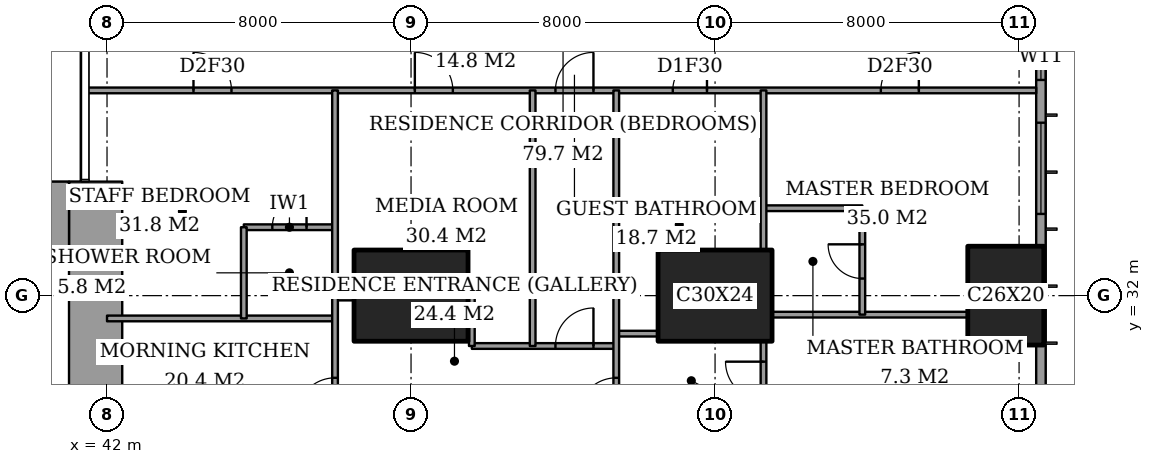
"""IFC4 building model, lengths in metres.
Left out: names, types, materials, properties, quantities, classifications, styles, units other than length and angle.
Written with IfcOpenShell. Run it as: python <this file> out.ifc"""

import sys

from ifc_helpers import new_model, si_unit, direction, frame, frame_2d, origin, origin_2d, place, context, subcontext, project, spatial, rectangle, extrude, element, fill, save


model = new_model("IFC4")
c1 = context("Model", 3, precision=1e-05, world=origin(), true_north=direction((0.0, 1.0)))
c2 = subcontext(c1, "Body", "Model", "MODEL_VIEW")
j1 = project(units=[si_unit("LENGTHUNIT", "METRE"), si_unit("PLANEANGLEUNIT", "RADIAN")], contexts=[c1])
p1 = place(None, origin())
s1 = spatial("IfcSite", under=j1, at=p1, CompositionType="ELEMENT")
p2 = place(p1, origin())
s2 = spatial("IfcBuilding", under=s1, at=p2, CompositionType="ELEMENT")
p3 = place(p2, frame((0.0, 0.0, 164.6)))
s3 = spatial("IfcBuildingStorey", under=s2, at=p3, CompositionType="ELEMENT", Elevation=164.6)
for number, where, z_axis, x_axis in (
    (1, (50.0, 32.0, 0.0), (0.0, 0.0, 1.0), (1.0, 0.0, 0.0)),
    (2, (58.0, 32.0, 0.0), (0.0, 0.0, 1.0), (1.0, 0.0, 0.0)),
):
    element("IfcColumn", number, at=place(p3, frame(where, z_axis=z_axis, x_axis=x_axis)), inside=s3, PredefinedType="COLUMN", context=c2, shape_type="SweptSolid", body=[
        extrude(rectangle(XDim=3.0, YDim=2.4, at=origin_2d()), origin(), (0.0, 0.0, 1.0), 3.6),
    ])
p4 = place(p3, frame((65.65, 32.0, 0.0), z_axis=(0.0, 0.0, 1.0), x_axis=(0.0, 1.0, 0.0)))
e3 = element("IfcColumn", 3, at=p4, inside=s3, PredefinedType="COLUMN", context=c2, shape_type="SweptSolid", body=[
    extrude(rectangle(XDim=2.6, YDim=2.0, at=origin_2d()), origin(), (0.0, 0.0, 1.0), 3.6),
])
p5 = place(p3, frame((37.85, 34.0, 0.0), z_axis=(0.0, 0.0, 1.0), x_axis=(1.0, 0.0, 0.0)))
e4 = element("IfcWall", 4, at=p5, inside=s3, PredefinedType="SHEAR", context=c2, shape_type="SweptSolid", body=[
    extrude(rectangle(XDim=3.15, YDim=2.0, at=frame_2d((1.575, 0.0))), origin(), (0.0, 0.0, 1.0), 3.6),
])
p6 = place(p3, frame((41.7, 24.85, 0.0), z_axis=(0.0, 0.0, 1.0), x_axis=(0.0, 1.0, 0.0)))
e5 = element("IfcWall", 5, at=p6, inside=s3, PredefinedType="SHEAR", context=c2, shape_type="SweptSolid", body=[
    extrude(rectangle(XDim=10.15, YDim=1.4, at=frame_2d((5.075, 0.0))), origin(), (0.0, 0.0, 1.0), 3.6),
])
p7 = place(p3, frame((66.575, 3.175, 0.0), z_axis=(0.0, 0.0, 1.0), x_axis=(0.0, 1.0, 0.0)))
e6 = element("IfcWall", 6, at=p7, inside=s3, PredefinedType="SOLIDWALL", context=c2, shape_type="SweptSolid", body=[
    extrude(rectangle(XDim=41.65, YDim=0.25, at=frame_2d((20.825, 0.0))), origin(), (0.0, 0.0, 1.0), 3.6),
])
p8 = place(p7, frame((0.775, 0.0, 0.4)))
e7 = element("IfcOpeningElement", 7, at=p8, cuts=e6, PredefinedType="OPENING", context=c2, shape_type="SweptSolid", body=[
    extrude(rectangle(XDim=2.4, YDim=2.2, at=frame_2d((1.2, 1.1))), frame((0.0, 0.135, 0.0), z_axis=(0.0, -1.0, 0.0), x_axis=(1.0, 0.0, 0.0)), (0.0, 0.0, 1.0), 0.27),
])
p9 = place(p7, frame((6.225, 0.0, 0.4)))
e8 = element("IfcOpeningElement", 8, at=p9, cuts=e6, PredefinedType="OPENING", context=c2, shape_type="SweptSolid", body=[
    extrude(rectangle(XDim=1.2, YDim=2.2, at=frame_2d((0.6, 1.1))), frame((0.0, 0.135, 0.0), z_axis=(0.0, -1.0, 0.0), x_axis=(1.0, 0.0, 0.0)), (0.0, 0.0, 1.0), 0.27),
])
p10 = place(p7, frame((8.475, 0.0, 0.4)))
e9 = element("IfcOpeningElement", 9, at=p10, cuts=e6, PredefinedType="OPENING", context=c2, shape_type="SweptSolid", body=[
    extrude(rectangle(XDim=2.4, YDim=2.2, at=frame_2d((1.2, 1.1))), frame((0.0, 0.135, 0.0), z_axis=(0.0, -1.0, 0.0), x_axis=(1.0, 0.0, 0.0)), (0.0, 0.0, 1.0), 0.27),
])
p11 = place(p7, frame((15.775, 0.0, 0.4)))
e10 = element("IfcOpeningElement", 10, at=p11, cuts=e6, PredefinedType="OPENING", context=c2, shape_type="SweptSolid", body=[
    extrude(rectangle(XDim=2.4, YDim=2.2, at=frame_2d((1.2, 1.1))), frame((0.0, 0.135, 0.0), z_axis=(0.0, -1.0, 0.0), x_axis=(1.0, 0.0, 0.0)), (0.0, 0.0, 1.0), 0.27),
])
p12 = place(p7, frame((23.475, 0.0, 0.4)))
e11 = element("IfcOpeningElement", 11, at=p12, cuts=e6, PredefinedType="OPENING", context=c2, shape_type="SweptSolid", body=[
    extrude(rectangle(XDim=2.4, YDim=2.2, at=frame_2d((1.2, 1.1))), frame((0.0, 0.135, 0.0), z_axis=(0.0, -1.0, 0.0), x_axis=(1.0, 0.0, 0.0)), (0.0, 0.0, 1.0), 0.27),
])
p13 = place(p7, frame((30.975, 0.0, 0.4)))
e12 = element("IfcOpeningElement", 12, at=p13, cuts=e6, PredefinedType="OPENING", context=c2, shape_type="SweptSolid", body=[
    extrude(rectangle(XDim=2.4, YDim=2.2, at=frame_2d((1.2, 1.1))), frame((0.0, 0.135, 0.0), z_axis=(0.0, -1.0, 0.0), x_axis=(1.0, 0.0, 0.0)), (0.0, 0.0, 1.0), 0.27),
])
p14 = place(p7, frame((34.5, 0.0, 0.4)))
e13 = element("IfcOpeningElement", 13, at=p14, cuts=e6, PredefinedType="OPENING", context=c2, shape_type="SweptSolid", body=[
    extrude(rectangle(XDim=1.2, YDim=2.2, at=frame_2d((0.6, 1.1))), frame((0.0, 0.135, 0.0), z_axis=(0.0, -1.0, 0.0), x_axis=(1.0, 0.0, 0.0)), (0.0, 0.0, 1.0), 0.27),
])
p15 = place(p7, frame((38.475, 0.0, 0.4)))
e14 = element("IfcOpeningElement", 14, at=p15, cuts=e6, PredefinedType="OPENING", context=c2, shape_type="SweptSolid", body=[
    extrude(rectangle(XDim=2.4, YDim=2.2, at=frame_2d((1.2, 1.1))), frame((0.0, 0.135, 0.0), z_axis=(0.0, -1.0, 0.0), x_axis=(1.0, 0.0, 0.0)), (0.0, 0.0, 1.0), 0.27),
])
p16 = place(p3, frame((51.6, 30.675, 0.0), z_axis=(0.0, 0.0, 1.0), x_axis=(1.0, 0.0, 0.0)))
e15 = element("IfcWall", 15, at=p16, inside=s3, PredefinedType="PARTITIONING", context=c2, shape_type="SweptSolid", body=[
    extrude(rectangle(XDim=3.8, YDim=0.15, at=frame_2d((1.9, 0.0))), origin(), (0.0, 0.0, 1.0), 3.35),
])
p17 = place(p16, frame((2.2, 0.0, 0.0)))
e16 = element("IfcOpeningElement", 16, at=p17, cuts=e15, PredefinedType="OPENING", context=c2, shape_type="SweptSolid", body=[
    extrude(rectangle(XDim=1.0, YDim=2.1, at=frame_2d((0.5, 1.05))), frame((0.0, 0.085, 0.0), z_axis=(0.0, -1.0, 0.0), x_axis=(1.0, 0.0, 0.0)), (0.0, 0.0, 1.0), 0.17),
])
p18 = place(p3, frame((55.4, 31.0, 0.0), z_axis=(0.0, 0.0, 1.0), x_axis=(1.0, 0.0, 0.0)))
e17 = element("IfcWall", 17, at=p18, inside=s3, PredefinedType="PARTITIONING", context=c2, shape_type="SweptSolid", body=[
    extrude(rectangle(XDim=1.1, YDim=0.15, at=frame_2d((0.55, 0.0))), origin(), (0.0, 0.0, 1.0), 3.35),
])
p19 = place(p3, frame((42.0, 31.4, 0.0), z_axis=(0.0, 0.0, 1.0), x_axis=(1.0, 0.0, 0.0)))
e18 = element("IfcWall", 18, at=p19, inside=s3, PredefinedType="PARTITIONING", context=c2, shape_type="SweptSolid", body=[
    extrude(rectangle(XDim=6.0, YDim=0.15, at=frame_2d((3.0, 0.0))), origin(), (0.0, 0.0, 1.0), 3.35),
])
p20 = place(p3, frame((59.5, 31.5, 0.0), z_axis=(0.0, 0.0, 1.0), x_axis=(1.0, 0.0, 0.0)))
e19 = element("IfcWall", 19, at=p20, inside=s3, PredefinedType="PARTITIONING", context=c2, shape_type="SweptSolid", body=[
    extrude(rectangle(XDim=5.15, YDim=0.15, at=frame_2d((2.575, 0.0))), origin(), (0.0, 0.0, 1.0), 3.35),
])
p21 = place(p3, frame((48.0, 31.95, 0.0), z_axis=(0.0, 0.0, 1.0), x_axis=(1.0, 0.0, 0.0)))
e20 = element("IfcWall", 20, at=p21, inside=s3, PredefinedType="PARTITIONING", context=c2, shape_type="SweptSolid", body=[
    extrude(rectangle(XDim=0.5, YDim=0.15, at=frame_2d((0.25, 0.0))), origin(), (0.0, 0.0, 1.0), 2.634),
])
p22 = place(p3, frame((45.6, 33.8, 0.0), z_axis=(0.0, 0.0, 1.0), x_axis=(1.0, 0.0, 0.0)))
e21 = element("IfcWall", 21, at=p22, inside=s3, PredefinedType="PARTITIONING", context=c2, shape_type="SweptSolid", body=[
    extrude(rectangle(XDim=2.4, YDim=0.15, at=frame_2d((1.2, 0.0))), origin(), (0.0, 0.0, 1.0), 3.35),
])
p23 = place(p22, frame((0.75, 0.0, 0.0)))
e22 = element("IfcOpeningElement", 22, at=p23, cuts=e21, PredefinedType="OPENING", context=c2, shape_type="SweptSolid", body=[
    extrude(rectangle(XDim=0.9, YDim=2.1, at=frame_2d((0.45, 1.05))), frame((0.0, 0.085, 0.0), z_axis=(0.0, -1.0, 0.0), x_axis=(1.0, 0.0, 0.0)), (0.0, 0.0, 1.0), 0.17),
])
p24 = place(p3, frame((59.275, 34.3, 0.0), z_axis=(0.0, 0.0, 1.0), x_axis=(1.0, 0.0, 0.0)))
e23 = element("IfcWall", 23, at=p24, inside=s3, PredefinedType="PARTITIONING", context=c2, shape_type="SweptSolid", body=[
    extrude(rectangle(XDim=2.6, YDim=0.15, at=frame_2d((1.3, 0.0))), origin(), (0.0, 0.0, 1.0), 3.35),
])
p25 = place(p3, frame((41.439, 37.4, 0.0), z_axis=(0.0, 0.0, 1.0), x_axis=(1.0, 0.0, 0.0)))
e24 = element("IfcWall", 24, at=p25, inside=s3, PredefinedType="PARTITIONING", context=c2, shape_type="SweptSolid", body=[
    extrude(rectangle(XDim=25.011, YDim=0.15, at=frame_2d((12.505, 0.0))), origin(), (0.0, 0.0, 1.0), 3.35),
])
p26 = place(p25, frame((12.361, 0.0, 0.0)))
e25 = element("IfcOpeningElement", 25, at=p26, cuts=e24, PredefinedType="OPENING", context=c2, shape_type="SweptSolid", body=[
    extrude(rectangle(XDim=1.0, YDim=2.1, at=frame_2d((0.5, 1.05))), frame((0.0, 0.085, 0.0), z_axis=(0.0, -1.0, 0.0), x_axis=(1.0, 0.0, 0.0)), (0.0, 0.0, 1.0), 0.17),
])
p27 = place(p25, frame((20.924, 0.0, 0.0)))
e26 = element("IfcOpeningElement", 26, at=p27, cuts=e24, PredefinedType="OPENING", context=c2, shape_type="SweptSolid", body=[
    extrude(rectangle(XDim=1.0, YDim=2.1, at=frame_2d((0.5, 1.05))), frame((0.0, 0.085, 0.0), z_axis=(0.0, -1.0, 0.0), x_axis=(1.0, 0.0, 0.0)), (0.0, 0.0, 1.0), 0.17),
])
p28 = place(p25, frame((15.448, 0.0, 0.0)))
e27 = element("IfcOpeningElement", 27, at=p28, cuts=e24, PredefinedType="OPENING", context=c2, shape_type="SweptSolid", body=[
    extrude(rectangle(XDim=0.9, YDim=2.1, at=frame_2d((0.45, 1.05))), frame((0.0, 0.085, 0.0), z_axis=(0.0, -1.0, 0.0), x_axis=(1.0, 0.0, 0.0)), (0.0, 0.0, 1.0), 0.17),
])
p29 = place(p25, frame((8.661, 0.0, 0.0)))
e28 = element("IfcOpeningElement", 28, at=p29, cuts=e24, PredefinedType="OPENING", context=c2, shape_type="SweptSolid", body=[
    extrude(rectangle(XDim=1.0, YDim=2.1, at=frame_2d((0.5, 1.05))), frame((0.0, 0.085, 0.0), z_axis=(0.0, -1.0, 0.0), x_axis=(1.0, 0.0, 0.0)), (0.0, 0.0, 1.0), 0.17),
])
p30 = place(p25, frame((2.836, 0.0, 0.0)))
e29 = element("IfcOpeningElement", 29, at=p30, cuts=e24, PredefinedType="OPENING", context=c2, shape_type="SweptSolid", body=[
    extrude(rectangle(XDim=1.0, YDim=2.1, at=frame_2d((0.5, 1.05))), frame((0.0, 0.085, 0.0), z_axis=(0.0, -1.0, 0.0), x_axis=(1.0, 0.0, 0.0)), (0.0, 0.0, 1.0), 0.17),
])
p31 = place(p3, frame((45.6, 31.4, 0.0), z_axis=(0.0, 0.0, 1.0), x_axis=(0.0, 1.0, 0.0)))
e30 = element("IfcWall", 30, at=p31, inside=s3, PredefinedType="PARTITIONING", context=c2, shape_type="SweptSolid", body=[
    extrude(rectangle(XDim=2.4, YDim=0.15, at=frame_2d((1.2, 0.0))), origin(), (0.0, 0.0, 1.0), 3.35),
])
p32 = place(p3, frame((48.0, 28.0, 0.0), z_axis=(0.0, 0.0, 1.0), x_axis=(0.0, 1.0, 0.0)))
e31 = element("IfcWall", 31, at=p32, inside=s3, PredefinedType="PARTITIONING", context=c2, shape_type="SweptSolid", body=[
    extrude(rectangle(XDim=9.4, YDim=0.15, at=frame_2d((4.7, 0.0))), origin(), (0.0, 0.0, 1.0), 3.35),
])
p33 = place(p32, frame((0.837, 0.0, 0.0)))
e32 = element("IfcOpeningElement", 32, at=p33, cuts=e31, PredefinedType="OPENING", context=c2, shape_type="SweptSolid", body=[
    extrude(rectangle(XDim=1.0, YDim=2.1, at=frame_2d((0.5, 1.05))), frame((0.0, 0.085, 0.0), z_axis=(0.0, -1.0, 0.0), x_axis=(1.0, 0.0, 0.0)), (0.0, 0.0, 1.0), 0.17),
])
p34 = place(p3, frame((51.6, 30.675, 0.0), z_axis=(0.0, 0.0, 1.0), x_axis=(0.0, 1.0, 0.0)))
e33 = element("IfcWall", 33, at=p34, inside=s3, PredefinedType="PARTITIONING", context=c2, shape_type="SweptSolid", body=[
    extrude(rectangle(XDim=1.275, YDim=0.15, at=frame_2d((0.637, 0.0))), origin(), (0.0, 0.0, 1.0), 3.35),
])
p35 = place(p3, frame((53.2, 30.675, 0.0), z_axis=(0.0, 0.0, 1.0), x_axis=(0.0, 1.0, 0.0)))
e34 = element("IfcWall", 34, at=p35, inside=s3, PredefinedType="PARTITIONING", context=c2, shape_type="SweptSolid", body=[
    extrude(rectangle(XDim=6.725, YDim=0.15, at=frame_2d((3.362, 0.0))), origin(), (0.0, 0.0, 1.0), 3.35),
])
p36 = place(p3, frame((55.4, 28.0, 0.0), z_axis=(0.0, 0.0, 1.0), x_axis=(0.0, 1.0, 0.0)))
e35 = element("IfcWall", 35, at=p36, inside=s3, PredefinedType="PARTITIONING", context=c2, shape_type="SweptSolid", body=[
    extrude(rectangle(XDim=9.4, YDim=0.15, at=frame_2d((4.7, 0.0))), origin(), (0.0, 0.0, 1.0), 3.35),
])
p37 = place(p36, frame((0.837, 0.0, 0.0)))
e36 = element("IfcOpeningElement", 36, at=p37, cuts=e35, PredefinedType="OPENING", context=c2, shape_type="SweptSolid", body=[
    extrude(rectangle(XDim=1.0, YDim=2.1, at=frame_2d((0.5, 1.05))), frame((0.0, 0.085, 0.0), z_axis=(0.0, -1.0, 0.0), x_axis=(1.0, 0.0, 0.0)), (0.0, 0.0, 1.0), 0.17),
])
p38 = place(p3, frame((59.275, 28.35, 0.0), z_axis=(0.0, 0.0, 1.0), x_axis=(0.0, 1.0, 0.0)))
e37 = element("IfcWall", 37, at=p38, inside=s3, PredefinedType="PARTITIONING", context=c2, shape_type="SweptSolid", body=[
    extrude(rectangle(XDim=2.45, YDim=0.15, at=frame_2d((1.225, 0.0))), origin(), (0.0, 0.0, 1.0), 3.35),
])
p39 = place(p38, frame((0.913, 0.0, 0.0)))
e38 = element("IfcOpeningElement", 38, at=p39, cuts=e37, PredefinedType="OPENING", context=c2, shape_type="SweptSolid", body=[
    extrude(rectangle(XDim=1.0, YDim=2.1, at=frame_2d((0.5, 1.05))), frame((0.0, 0.085, 0.0), z_axis=(0.0, -1.0, 0.0), x_axis=(1.0, 0.0, 0.0)), (0.0, 0.0, 1.0), 0.17),
])
p40 = place(p3, frame((59.275, 33.2, 0.0), z_axis=(0.0, 0.0, 1.0), x_axis=(0.0, 1.0, 0.0)))
e39 = element("IfcWall", 39, at=p40, inside=s3, PredefinedType="PARTITIONING", context=c2, shape_type="SweptSolid", body=[
    extrude(rectangle(XDim=4.2, YDim=0.15, at=frame_2d((2.1, 0.0))), origin(), (0.0, 0.0, 1.0), 3.35),
])
p41 = place(p3, frame((61.875, 31.5, 0.0), z_axis=(0.0, 0.0, 1.0), x_axis=(0.0, 1.0, 0.0)))
e40 = element("IfcWall", 40, at=p41, inside=s3, PredefinedType="PARTITIONING", context=c2, shape_type="SweptSolid", body=[
    extrude(rectangle(XDim=2.8, YDim=0.15, at=frame_2d((1.4, 0.0))), origin(), (0.0, 0.0, 1.0), 3.35),
])
p42 = place(p41, frame((0.95, 0.0, 0.0)))
e41 = element("IfcOpeningElement", 41, at=p42, cuts=e40, PredefinedType="OPENING", context=c2, shape_type="SweptSolid", body=[
    extrude(rectangle(XDim=0.9, YDim=2.1, at=frame_2d((0.45, 1.05))), frame((0.0, 0.085, 0.0), z_axis=(0.0, -1.0, 0.0), x_axis=(1.0, 0.0, 0.0)), (0.0, 0.0, 1.0), 0.17),
])
p43 = place(p13, origin())
e42 = element("IfcWindow", 42, at=p43, inside=s3, PartitioningType="SINGLE_PANEL", PredefinedType="WINDOW", context=c2, shape_type="SweptSolid", body=[
    extrude(rectangle(XDim=2.4, YDim=2.2, at=frame_2d((1.2, 1.1))), frame((0.0, 0.03, 0.0), z_axis=(0.0, -1.0, 0.0), x_axis=(1.0, 0.0, 0.0)), (0.0, 0.0, 1.0), 0.06),
])
fill(e12, e42)
p44 = place(p14, origin())
e43 = element("IfcWindow", 43, at=p44, inside=s3, PartitioningType="SINGLE_PANEL", PredefinedType="WINDOW", context=c2, shape_type="SweptSolid", body=[
    extrude(rectangle(XDim=1.2, YDim=2.2, at=frame_2d((0.6, 1.1))), frame((0.0, 0.03, 0.0), z_axis=(0.0, -1.0, 0.0), x_axis=(1.0, 0.0, 0.0)), (0.0, 0.0, 1.0), 0.06),
])
fill(e13, e43)
p45 = place(p26, origin())
e44 = element("IfcDoor", 44, at=p45, inside=s3, OperationType="SINGLE_SWING_LEFT", PredefinedType="DOOR", context=c2, shape_type="SweptSolid", body=[
    extrude(rectangle(XDim=1.0, YDim=2.1, at=frame_2d((0.5, 1.05))), frame((0.0, 0.025, 0.0), z_axis=(0.0, -1.0, 0.0), x_axis=(1.0, 0.0, 0.0)), (0.0, 0.0, 1.0), 0.05),
])
fill(e25, e44)
p46 = place(p42, origin())
e45 = element("IfcDoor", 45, at=p46, inside=s3, OperationType="SINGLE_SWING_LEFT", PredefinedType="DOOR", context=c2, shape_type="SweptSolid", body=[
    extrude(rectangle(XDim=0.9, YDim=2.1, at=frame_2d((0.45, 1.05))), frame((0.0, 0.025, 0.0), z_axis=(0.0, -1.0, 0.0), x_axis=(1.0, 0.0, 0.0)), (0.0, 0.0, 1.0), 0.05),
])
fill(e41, e45)
p47 = place(p27, origin())
e46 = element("IfcDoor", 46, at=p47, inside=s3, OperationType="SINGLE_SWING_LEFT", PredefinedType="DOOR", context=c2, shape_type="SweptSolid", body=[
    extrude(rectangle(XDim=1.0, YDim=2.1, at=frame_2d((0.5, 1.05))), frame((0.0, 0.025, 0.0), z_axis=(0.0, -1.0, 0.0), x_axis=(1.0, 0.0, 0.0)), (0.0, 0.0, 1.0), 0.05),
])
fill(e26, e46)
p48 = place(p39, origin())
e47 = element("IfcDoor", 47, at=p48, inside=s3, OperationType="SINGLE_SWING_LEFT", PredefinedType="DOOR", context=c2, shape_type="SweptSolid", body=[
    extrude(rectangle(XDim=1.0, YDim=2.1, at=frame_2d((0.5, 1.05))), frame((0.0, 0.025, 0.0), z_axis=(0.0, -1.0, 0.0), x_axis=(1.0, 0.0, 0.0)), (0.0, 0.0, 1.0), 0.05),
])
fill(e38, e47)
p49 = place(p28, origin())
e48 = element("IfcDoor", 48, at=p49, inside=s3, OperationType="SINGLE_SWING_LEFT", PredefinedType="DOOR", context=c2, shape_type="SweptSolid", body=[
    extrude(rectangle(XDim=0.9, YDim=2.1, at=frame_2d((0.45, 1.05))), frame((0.0, 0.025, 0.0), z_axis=(0.0, -1.0, 0.0), x_axis=(1.0, 0.0, 0.0)), (0.0, 0.0, 1.0), 0.05),
])
fill(e27, e48)
p50 = place(p37, origin())
e49 = element("IfcDoor", 49, at=p50, inside=s3, OperationType="SINGLE_SWING_RIGHT", PredefinedType="DOOR", context=c2, shape_type="SweptSolid", body=[
    extrude(rectangle(XDim=1.0, YDim=2.1, at=frame_2d((0.5, 1.05))), frame((0.0, 0.025, 0.0), z_axis=(0.0, -1.0, 0.0), x_axis=(1.0, 0.0, 0.0)), (0.0, 0.0, 1.0), 0.05),
])
fill(e36, e49)
p51 = place(p17, origin())
e50 = element("IfcDoor", 50, at=p51, inside=s3, OperationType="SINGLE_SWING_LEFT", PredefinedType="DOOR", context=c2, shape_type="SweptSolid", body=[
    extrude(rectangle(XDim=1.0, YDim=2.1, at=frame_2d((0.5, 1.05))), frame((0.0, 0.025, 0.0), z_axis=(0.0, -1.0, 0.0), x_axis=(1.0, 0.0, 0.0)), (0.0, 0.0, 1.0), 0.05),
])
fill(e16, e50)
p52 = place(p29, origin())
e51 = element("IfcDoor", 51, at=p52, inside=s3, OperationType="SINGLE_SWING_RIGHT", PredefinedType="DOOR", context=c2, shape_type="SweptSolid", body=[
    extrude(rectangle(XDim=1.0, YDim=2.1, at=frame_2d((0.5, 1.05))), frame((0.0, 0.025, 0.0), z_axis=(0.0, -1.0, 0.0), x_axis=(1.0, 0.0, 0.0)), (0.0, 0.0, 1.0), 0.05),
])
fill(e28, e51)
p53 = place(p23, origin())
e52 = element("IfcDoor", 52, at=p53, inside=s3, OperationType="SINGLE_SWING_LEFT", PredefinedType="DOOR", context=c2, shape_type="SweptSolid", body=[
    extrude(rectangle(XDim=0.9, YDim=2.1, at=frame_2d((0.45, 1.05))), frame((0.0, 0.025, 0.0), z_axis=(0.0, -1.0, 0.0), x_axis=(1.0, 0.0, 0.0)), (0.0, 0.0, 1.0), 0.05),
])
fill(e22, e52)
p54 = place(p30, origin())
e53 = element("IfcDoor", 53, at=p54, inside=s3, OperationType="SINGLE_SWING_RIGHT", PredefinedType="DOOR", context=c2, shape_type="SweptSolid", body=[
    extrude(rectangle(XDim=1.0, YDim=2.1, at=frame_2d((0.5, 1.05))), frame((0.0, 0.025, 0.0), z_axis=(0.0, -1.0, 0.0), x_axis=(1.0, 0.0, 0.0)), (0.0, 0.0, 1.0), 0.05),
])
fill(e29, e53)
p55 = place(p33, origin())
e54 = element("IfcDoor", 54, at=p55, inside=s3, OperationType="SINGLE_SWING_RIGHT", PredefinedType="DOOR", context=c2, shape_type="SweptSolid", body=[
    extrude(rectangle(XDim=1.0, YDim=2.1, at=frame_2d((0.5, 1.05))), frame((0.0, 0.025, 0.0), z_axis=(0.0, -1.0, 0.0), x_axis=(1.0, 0.0, 0.0)), (0.0, 0.0, 1.0), 0.05),
])
fill(e32, e54)
save(model, sys.argv[1])
